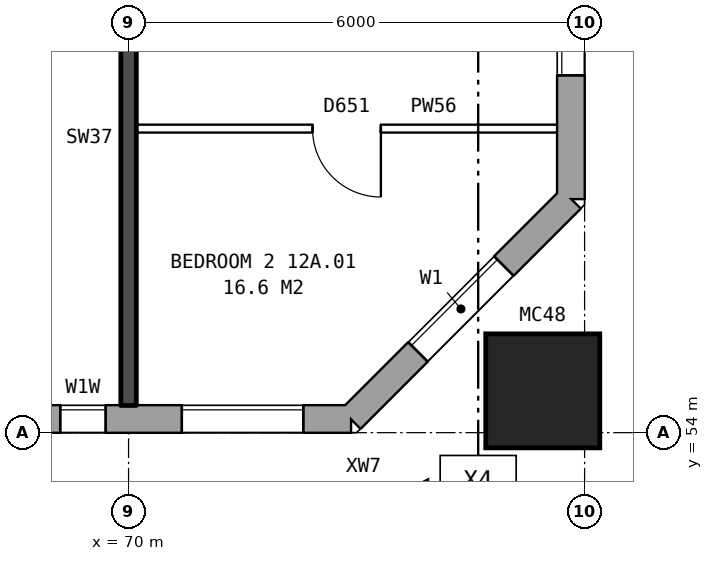
"""IFC4 building model, lengths in metres.
Left out: names, types, materials, properties, quantities, classifications, styles, units other than length and angle.
Written with IfcOpenShell. Run it as: python <this file> out.ifc"""

import sys

from ifc_helpers import new_model, si_unit, direction, frame, frame_2d, origin, origin_2d, place, context, subcontext, project, spatial, rectangle, hollow_rectangle, extrude, element, fill, save


model = new_model("IFC4")
c1 = context("Model", 3, precision=1e-05, world=origin(), true_north=direction((0.0, 1.0)))
c2 = subcontext(c1, "Body", "Model", "MODEL_VIEW")
j1 = project(units=[si_unit("LENGTHUNIT", "METRE"), si_unit("PLANEANGLEUNIT", "RADIAN")], contexts=[c1])
p1 = place(None, origin())
s1 = spatial("IfcSite", under=j1, at=p1, CompositionType="ELEMENT")
p2 = place(p1, origin())
s2 = spatial("IfcBuilding", under=s1, at=p2, CompositionType="ELEMENT")
p3 = place(p2, frame((0.0, 0.0, 47.4)))
s3 = spatial("IfcBuildingStorey", under=s2, at=p3, CompositionType="ELEMENT", Elevation=47.4)
p4 = place(p3, frame((75.45, 54.55, 0.0), z_axis=(0.0, 0.0, 1.0), x_axis=(1.0, 0.0, 0.0)))
e1 = element("IfcColumn", 1, at=p4, inside=s3, PredefinedType="COLUMN", context=c2, shape_type="SweptSolid", body=[
    extrude(hollow_rectangle(XDim=1.5, YDim=1.5, WallThickness=0.08, at=origin_2d()), origin(), (0.0, 0.0, 1.0), 3.1),
])
p5 = place(p3, frame((24.575, 54.18, 0.0), z_axis=(0.0, 0.0, 1.0), x_axis=(1.0, 0.0, 0.0)))
e2 = element("IfcWall", 2, at=p5, inside=s3, PredefinedType="STANDARD", context=c2, shape_type="SweptSolid", body=[
    extrude(rectangle(XDim=48.351, YDim=0.36, at=frame_2d((24.175, 0.0))), origin(), (0.0, 0.0, 1.0), 2.85),
])
p6 = place(p5, frame((1.125, 0.0, 0.8)))
e3 = element("IfcOpeningElement", 3, at=p6, cuts=e2, PredefinedType="OPENING", context=c2, shape_type="SweptSolid", body=[
    extrude(rectangle(XDim=1.6, YDim=1.8, at=frame_2d((0.8, 0.9))), frame((0.0, 0.19, 0.0), z_axis=(0.0, -1.0, 0.0), x_axis=(1.0, 0.0, 0.0)), (0.0, 0.0, 1.0), 0.38),
])
p7 = place(p5, frame((5.625, 0.0, 0.8)))
e4 = element("IfcOpeningElement", 4, at=p7, cuts=e2, PredefinedType="OPENING", context=c2, shape_type="SweptSolid", body=[
    extrude(rectangle(XDim=1.2, YDim=1.2, at=frame_2d((0.6, 0.6))), frame((0.0, 0.19, 0.0), z_axis=(0.0, -1.0, 0.0), x_axis=(1.0, 0.0, 0.0)), (0.0, 0.0, 1.0), 0.38),
])
p8 = place(p5, frame((7.125, 0.0, 0.8)))
e5 = element("IfcOpeningElement", 5, at=p8, cuts=e2, PredefinedType="OPENING", context=c2, shape_type="SweptSolid", body=[
    extrude(rectangle(XDim=1.6, YDim=1.8, at=frame_2d((0.8, 0.9))), frame((0.0, 0.19, 0.0), z_axis=(0.0, -1.0, 0.0), x_axis=(1.0, 0.0, 0.0)), (0.0, 0.0, 1.0), 0.38),
])
p9 = place(p5, frame((10.125, 0.0, 0.8)))
e6 = element("IfcOpeningElement", 6, at=p9, cuts=e2, PredefinedType="OPENING", context=c2, shape_type="SweptSolid", body=[
    extrude(rectangle(XDim=1.6, YDim=1.8, at=frame_2d((0.8, 0.9))), frame((0.0, 0.19, 0.0), z_axis=(0.0, -1.0, 0.0), x_axis=(1.0, 0.0, 0.0)), (0.0, 0.0, 1.0), 0.38),
])
p10 = place(p5, frame((13.125, 0.0, 0.8)))
e7 = element("IfcOpeningElement", 7, at=p10, cuts=e2, PredefinedType="OPENING", context=c2, shape_type="SweptSolid", body=[
    extrude(rectangle(XDim=1.6, YDim=1.8, at=frame_2d((0.8, 0.9))), frame((0.0, 0.19, 0.0), z_axis=(0.0, -1.0, 0.0), x_axis=(1.0, 0.0, 0.0)), (0.0, 0.0, 1.0), 0.38),
])
p11 = place(p5, frame((16.125, 0.0, 0.8)))
e8 = element("IfcOpeningElement", 8, at=p11, cuts=e2, PredefinedType="OPENING", context=c2, shape_type="SweptSolid", body=[
    extrude(rectangle(XDim=1.6, YDim=1.8, at=frame_2d((0.8, 0.9))), frame((0.0, 0.19, 0.0), z_axis=(0.0, -1.0, 0.0), x_axis=(1.0, 0.0, 0.0)), (0.0, 0.0, 1.0), 0.38),
])
p12 = place(p5, frame((19.125, 0.0, 0.8)))
e9 = element("IfcOpeningElement", 9, at=p12, cuts=e2, PredefinedType="OPENING", context=c2, shape_type="SweptSolid", body=[
    extrude(rectangle(XDim=1.6, YDim=1.8, at=frame_2d((0.8, 0.9))), frame((0.0, 0.19, 0.0), z_axis=(0.0, -1.0, 0.0), x_axis=(1.0, 0.0, 0.0)), (0.0, 0.0, 1.0), 0.38),
])
p13 = place(p5, frame((22.125, 0.0, 0.8)))
e10 = element("IfcOpeningElement", 10, at=p13, cuts=e2, PredefinedType="OPENING", context=c2, shape_type="SweptSolid", body=[
    extrude(rectangle(XDim=1.6, YDim=1.8, at=frame_2d((0.8, 0.9))), frame((0.0, 0.19, 0.0), z_axis=(0.0, -1.0, 0.0), x_axis=(1.0, 0.0, 0.0)), (0.0, 0.0, 1.0), 0.38),
])
p14 = place(p5, frame((25.125, 0.0, 0.8)))
e11 = element("IfcOpeningElement", 11, at=p14, cuts=e2, PredefinedType="OPENING", context=c2, shape_type="SweptSolid", body=[
    extrude(rectangle(XDim=1.6, YDim=1.8, at=frame_2d((0.8, 0.9))), frame((0.0, 0.19, 0.0), z_axis=(0.0, -1.0, 0.0), x_axis=(1.0, 0.0, 0.0)), (0.0, 0.0, 1.0), 0.38),
])
p15 = place(p5, frame((28.125, 0.0, 0.8)))
e12 = element("IfcOpeningElement", 12, at=p15, cuts=e2, PredefinedType="OPENING", context=c2, shape_type="SweptSolid", body=[
    extrude(rectangle(XDim=1.6, YDim=1.8, at=frame_2d((0.8, 0.9))), frame((0.0, 0.19, 0.0), z_axis=(0.0, -1.0, 0.0), x_axis=(1.0, 0.0, 0.0)), (0.0, 0.0, 1.0), 0.38),
])
p16 = place(p5, frame((31.125, 0.0, 0.8)))
e13 = element("IfcOpeningElement", 13, at=p16, cuts=e2, PredefinedType="OPENING", context=c2, shape_type="SweptSolid", body=[
    extrude(rectangle(XDim=1.6, YDim=1.8, at=frame_2d((0.8, 0.9))), frame((0.0, 0.19, 0.0), z_axis=(0.0, -1.0, 0.0), x_axis=(1.0, 0.0, 0.0)), (0.0, 0.0, 1.0), 0.38),
])
p17 = place(p5, frame((34.125, 0.0, 0.8)))
e14 = element("IfcOpeningElement", 14, at=p17, cuts=e2, PredefinedType="OPENING", context=c2, shape_type="SweptSolid", body=[
    extrude(rectangle(XDim=1.6, YDim=1.8, at=frame_2d((0.8, 0.9))), frame((0.0, 0.19, 0.0), z_axis=(0.0, -1.0, 0.0), x_axis=(1.0, 0.0, 0.0)), (0.0, 0.0, 1.0), 0.38),
])
p18 = place(p5, frame((37.125, 0.0, 0.8)))
e15 = element("IfcOpeningElement", 15, at=p18, cuts=e2, PredefinedType="OPENING", context=c2, shape_type="SweptSolid", body=[
    extrude(rectangle(XDim=1.6, YDim=1.8, at=frame_2d((0.8, 0.9))), frame((0.0, 0.19, 0.0), z_axis=(0.0, -1.0, 0.0), x_axis=(1.0, 0.0, 0.0)), (0.0, 0.0, 1.0), 0.38),
])
p19 = place(p5, frame((40.125, 0.0, 0.8)))
e16 = element("IfcOpeningElement", 16, at=p19, cuts=e2, PredefinedType="OPENING", context=c2, shape_type="SweptSolid", body=[
    extrude(rectangle(XDim=1.6, YDim=1.8, at=frame_2d((0.8, 0.9))), frame((0.0, 0.19, 0.0), z_axis=(0.0, -1.0, 0.0), x_axis=(1.0, 0.0, 0.0)), (0.0, 0.0, 1.0), 0.38),
])
p20 = place(p5, frame((42.025, 0.0, 0.8)))
e17 = element("IfcOpeningElement", 17, at=p20, cuts=e2, PredefinedType="OPENING", context=c2, shape_type="SweptSolid", body=[
    extrude(rectangle(XDim=1.0, YDim=0.9, at=frame_2d((0.5, 0.45))), frame((0.0, 0.19, 0.0), z_axis=(0.0, -1.0, 0.0), x_axis=(1.0, 0.0, 0.0)), (0.0, 0.0, 1.0), 0.38),
])
p21 = place(p5, frame((46.125, 0.0, 0.8)))
e18 = element("IfcOpeningElement", 18, at=p21, cuts=e2, PredefinedType="OPENING", context=c2, shape_type="SweptSolid", body=[
    extrude(rectangle(XDim=1.6, YDim=1.8, at=frame_2d((0.8, 0.9))), frame((0.0, 0.19, 0.0), z_axis=(0.0, -1.0, 0.0), x_axis=(1.0, 0.0, 0.0)), (0.0, 0.0, 1.0), 0.38),
])
p22 = place(p5, frame((44.525, 0.0, 1.7)))
e19 = element("IfcOpeningElement", 19, at=p22, cuts=e2, PredefinedType="OPENING", context=c2, shape_type="SweptSolid", body=[
    extrude(rectangle(XDim=0.6, YDim=0.9, at=frame_2d((0.3, 0.45))), frame((0.0, 0.19, 0.0), z_axis=(0.0, -1.0, 0.0), x_axis=(1.0, 0.0, 0.0)), (0.0, 0.0, 1.0), 0.38),
])
p23 = place(p3, frame((72.925, 54.18, 0.0), z_axis=(0.0, 0.0, 1.0), x_axis=(0.707106781187, 0.707106781187, 0.0)))
e20 = element("IfcWall", 20, at=p23, inside=s3, PredefinedType="STANDARD", context=c2, shape_type="SweptSolid", body=[
    extrude(rectangle(XDim=4.094, YDim=0.36, at=frame_2d((2.047, 0.0))), origin(), (0.0, 0.0, 1.0), 2.85),
])
p24 = place(p23, frame((1.247, 0.0, 0.8)))
e21 = element("IfcOpeningElement", 21, at=p24, cuts=e20, PredefinedType="OPENING", context=c2, shape_type="SweptSolid", body=[
    extrude(rectangle(XDim=1.6, YDim=1.8, at=frame_2d((0.8, 0.9))), frame((0.0, 0.19, 0.0), z_axis=(0.0, -1.0, 0.0), x_axis=(1.0, 0.0, 0.0)), (0.0, 0.0, 1.0), 0.38),
])
p25 = place(p3, frame((75.82, 57.075, 0.0), z_axis=(0.0, 0.0, 1.0), x_axis=(0.0, 1.0, 0.0)))
e22 = element("IfcWall", 22, at=p25, inside=s3, PredefinedType="STANDARD", context=c2, shape_type="SweptSolid", body=[
    extrude(rectangle(XDim=25.851, YDim=0.36, at=frame_2d((12.925, 0.0))), origin(), (0.0, 0.0, 1.0), 2.85),
])
p26 = place(p25, frame((1.625, 0.0, 0.8)))
e23 = element("IfcOpeningElement", 23, at=p26, cuts=e22, PredefinedType="OPENING", context=c2, shape_type="SweptSolid", body=[
    extrude(rectangle(XDim=1.6, YDim=1.8, at=frame_2d((0.8, 0.9))), frame((0.0, 0.19, 0.0), z_axis=(0.0, -1.0, 0.0), x_axis=(1.0, 0.0, 0.0)), (0.0, 0.0, 1.0), 0.38),
])
p27 = place(p25, frame((3.525, 0.0, 1.7)))
e24 = element("IfcOpeningElement", 24, at=p27, cuts=e22, PredefinedType="OPENING", context=c2, shape_type="SweptSolid", body=[
    extrude(rectangle(XDim=1.4, YDim=0.9, at=frame_2d((0.7, 0.45))), frame((0.0, 0.19, 0.0), z_axis=(0.0, -1.0, 0.0), x_axis=(1.0, 0.0, 0.0)), (0.0, 0.0, 1.0), 0.38),
])
p28 = place(p25, frame((19.225, 0.0, 0.45)))
e25 = element("IfcOpeningElement", 25, at=p28, cuts=e22, PredefinedType="OPENING", context=c2, shape_type="SweptSolid", body=[
    extrude(rectangle(XDim=1.0, YDim=0.9, at=frame_2d((0.5, 0.45))), frame((0.0, 0.19, 0.0), z_axis=(0.0, -1.0, 0.0), x_axis=(1.0, 0.0, 0.0)), (0.0, 0.0, 1.0), 0.38),
])
p29 = place(p25, frame((22.625, 0.0, 0.8)))
e26 = element("IfcOpeningElement", 26, at=p29, cuts=e22, PredefinedType="OPENING", context=c2, shape_type="SweptSolid", body=[
    extrude(rectangle(XDim=1.6, YDim=1.8, at=frame_2d((0.8, 0.9))), frame((0.0, 0.19, 0.0), z_axis=(0.0, -1.0, 0.0), x_axis=(1.0, 0.0, 0.0)), (0.0, 0.0, 1.0), 0.38),
])
p30 = place(p25, frame((20.925, 0.0, 1.65)))
e27 = element("IfcOpeningElement", 27, at=p30, cuts=e22, PredefinedType="OPENING", context=c2, shape_type="SweptSolid", body=[
    extrude(rectangle(XDim=0.8, YDim=0.9, at=frame_2d((0.4, 0.45))), frame((0.0, 0.19, 0.0), z_axis=(0.0, -1.0, 0.0), x_axis=(1.0, 0.0, 0.0)), (0.0, 0.0, 1.0), 0.38),
])
p31 = place(p3, frame((70.1, 58.0, 0.0), z_axis=(0.0, 0.0, 1.0), x_axis=(1.0, 0.0, 0.0)))
e28 = element("IfcWall", 28, at=p31, inside=s3, PredefinedType="PARTITIONING", context=c2, shape_type="SweptSolid", body=[
    extrude(rectangle(XDim=5.54, YDim=0.1, at=frame_2d((2.77, 0.0))), origin(), (0.0, 0.0, 1.0), 2.85),
])
p32 = place(p31, frame((2.32, 0.0, 0.0)))
e29 = element("IfcOpeningElement", 29, at=p32, cuts=e28, PredefinedType="OPENING", context=c2, shape_type="SweptSolid", body=[
    extrude(rectangle(XDim=0.9, YDim=2.1, at=frame_2d((0.45, 1.05))), frame((0.0, 0.06, 0.0), z_axis=(0.0, -1.0, 0.0), x_axis=(1.0, 0.0, 0.0)), (0.0, 0.0, 1.0), 0.12),
])
p33 = place(p3, frame((70.0, 54.36, 0.0), z_axis=(0.0, 0.0, 1.0), x_axis=(0.0, 1.0, 0.0)))
e30 = element("IfcWall", 30, at=p33, inside=s3, PredefinedType="SOLIDWALL", context=c2, shape_type="SweptSolid", body=[
    extrude(rectangle(XDim=9.44, YDim=0.2, at=frame_2d((4.72, 0.0))), origin(), (0.0, 0.0, 1.0), 2.85),
])
p34 = place(p33, frame((7.04, 0.0, 0.0)))
e31 = element("IfcOpeningElement", 31, at=p34, cuts=e30, PredefinedType="OPENING", context=c2, shape_type="SweptSolid", body=[
    extrude(rectangle(XDim=0.9, YDim=2.1, at=frame_2d((0.45, 1.05))), frame((0.0, 0.11, 0.0), z_axis=(0.0, -1.0, 0.0), x_axis=(1.0, 0.0, 0.0)), (0.0, 0.0, 1.0), 0.22),
])
p35 = place(p21, origin())
e32 = element("IfcWindow", 32, at=p35, inside=s3, PartitioningType="SINGLE_PANEL", PredefinedType="WINDOW", context=c2, shape_type="SweptSolid", body=[
    extrude(rectangle(XDim=1.6, YDim=1.8, at=frame_2d((0.8, 0.9))), frame((0.0, 0.15, 0.0), z_axis=(0.0, -1.0, 0.0), x_axis=(1.0, 0.0, 0.0)), (0.0, 0.0, 1.0), 0.06),
])
fill(e18, e32)
p36 = place(p24, origin())
e33 = element("IfcWindow", 33, at=p36, inside=s3, PartitioningType="SINGLE_PANEL", PredefinedType="WINDOW", context=c2, shape_type="SweptSolid", body=[
    extrude(rectangle(XDim=1.6, YDim=1.8, at=frame_2d((0.8, 0.9))), frame((0.0, 0.15, 0.0), z_axis=(0.0, -1.0, 0.0), x_axis=(1.0, 0.0, 0.0)), (0.0, 0.0, 1.0), 0.06),
])
fill(e21, e33)
p37 = place(p26, origin())
e34 = element("IfcWindow", 34, at=p37, inside=s3, PartitioningType="SINGLE_PANEL", PredefinedType="WINDOW", context=c2, shape_type="SweptSolid", body=[
    extrude(rectangle(XDim=1.6, YDim=1.8, at=frame_2d((0.8, 0.9))), frame((0.0, 0.15, 0.0), z_axis=(0.0, -1.0, 0.0), x_axis=(1.0, 0.0, 0.0)), (0.0, 0.0, 1.0), 0.06),
])
fill(e23, e34)
p38 = place(p32, frame((0.9, 0.0, 0.0), z_axis=(0.0, 0.0, 1.0), x_axis=(-1.0, 0.0, 0.0)))
e35 = element("IfcDoor", 35, at=p38, inside=s3, OperationType="SINGLE_SWING_LEFT", PredefinedType="DOOR", context=c2, shape_type="SweptSolid", body=[
    extrude(rectangle(XDim=0.9, YDim=2.1, at=frame_2d((0.45, 1.05))), frame((0.0, 0.025, 0.0), z_axis=(0.0, -1.0, 0.0), x_axis=(1.0, 0.0, 0.0)), (0.0, 0.0, 1.0), 0.05),
])
fill(e29, e35)
p39 = place(p22, origin())
e36 = element("IfcWindow", 36, at=p39, inside=s3, PartitioningType="SINGLE_PANEL", PredefinedType="WINDOW", context=c2, shape_type="SweptSolid", body=[
    extrude(rectangle(XDim=0.6, YDim=0.9, at=frame_2d((0.3, 0.45))), frame((0.0, 0.15, 0.0), z_axis=(0.0, -1.0, 0.0), x_axis=(1.0, 0.0, 0.0)), (0.0, 0.0, 1.0), 0.06),
])
fill(e19, e36)
save(model, sys.argv[1])
